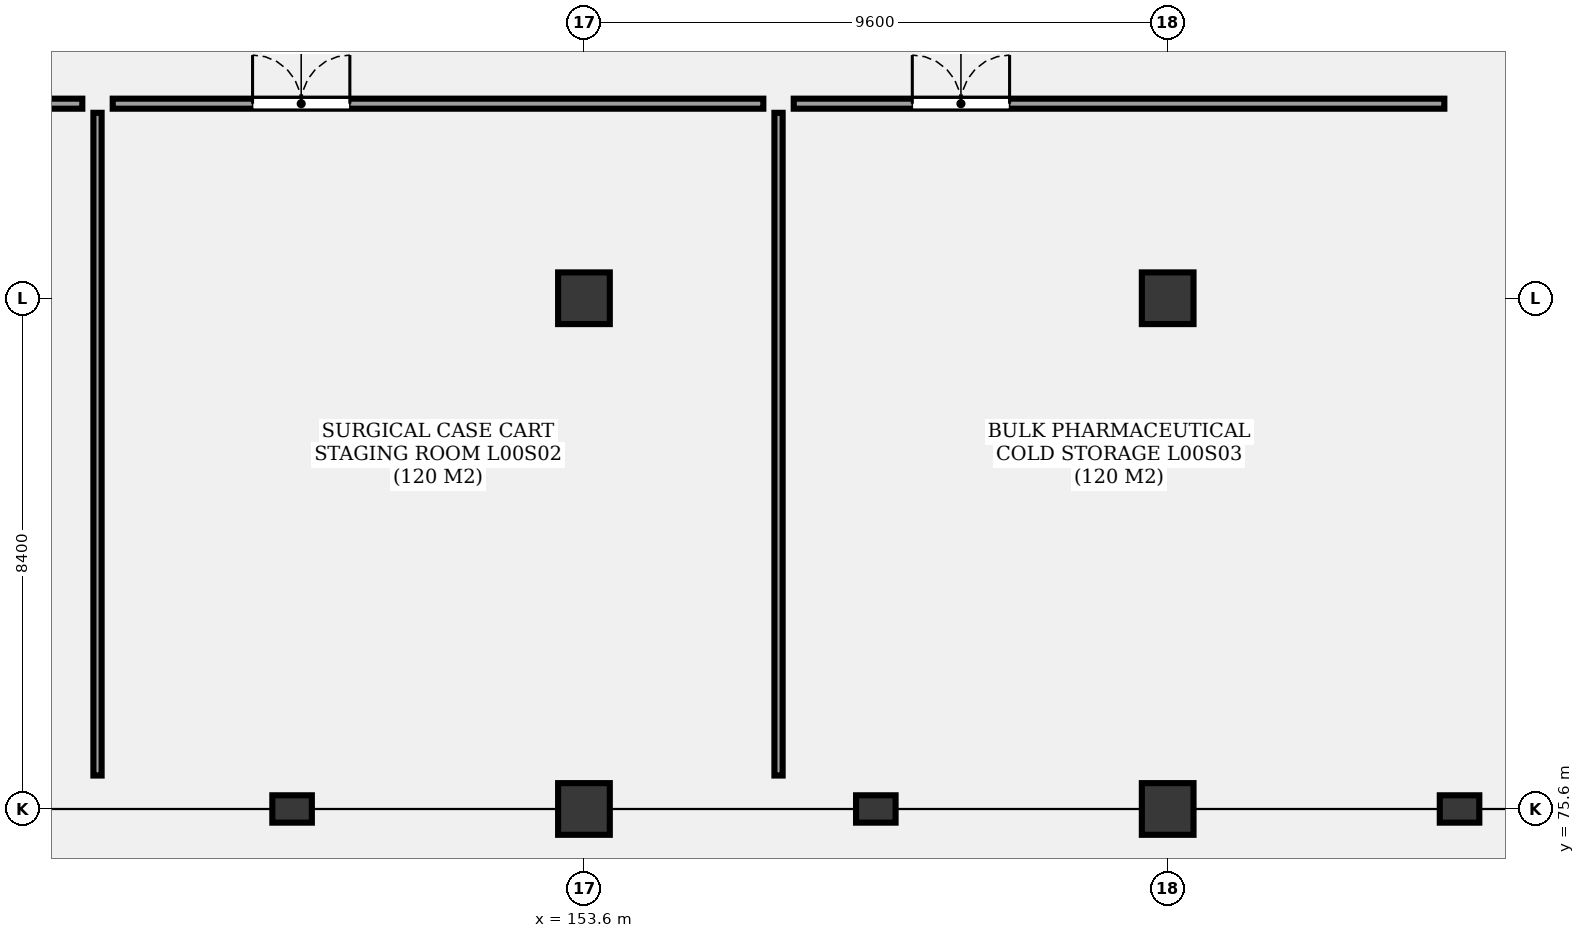
"""IFC4 building model, lengths in metres.
Left out: names, types, materials, properties, quantities, classifications, styles, units other than length and angle.
Written with IfcOpenShell. Run it as: python <this file> out.ifc"""

import sys

from ifc_helpers import new_model, si_unit, direction, frame, frame_2d, origin, origin_2d, place, context, subcontext, project, spatial, rectangle, extrude, element, fill, save


model = new_model("IFC4")
c1 = context("Model", 3, precision=1e-05, world=origin(), true_north=direction((0.0, 1.0)))
c2 = subcontext(c1, "Body", "Model", "MODEL_VIEW")
j1 = project(units=[si_unit("LENGTHUNIT", "METRE"), si_unit("PLANEANGLEUNIT", "RADIAN")], contexts=[c1])
p1 = place(None, origin())
s1 = spatial("IfcSite", under=j1, at=p1, CompositionType="ELEMENT")
p2 = place(p1, origin())
s2 = spatial("IfcBuilding", under=s1, at=p2, CompositionType="ELEMENT")
p3 = place(p2, origin())
s3 = spatial("IfcBuildingStorey", under=s2, at=p3, CompositionType="ELEMENT", Elevation=0.0)
for number, where, z_axis, x_axis in (
    (1, (153.6, 75.6, -0.35), (0.0, 0.0, 1.0), (1.0, 0.0, 0.0)),
    (2, (153.6, 84.0, -0.35), (0.0, 0.0, 1.0), (1.0, 0.0, 0.0)),
    (3, (163.2, 75.6, -0.35), (0.0, 0.0, 1.0), (1.0, 0.0, 0.0)),
    (4, (163.2, 84.0, -0.35), (0.0, 0.0, 1.0), (1.0, 0.0, 0.0)),
):
    element("IfcColumn", number, at=place(p3, frame(where, z_axis=z_axis, x_axis=x_axis)), inside=s3, PredefinedType="COLUMN", context=c2, shape_type="SweptSolid", body=[
        extrude(rectangle(XDim=0.85, YDim=0.85, at=origin_2d()), origin(), (0.0, 0.0, 1.0), 5.45),
    ])
for number, where, z_axis, x_axis in (
    (5, (148.8, 75.6, 0.0), (0.0, 0.0, 1.0), (1.0, 0.0, 0.0)),
    (6, (158.4, 75.6, 0.0), (0.0, 0.0, 1.0), (1.0, 0.0, 0.0)),
    (7, (168.0, 75.6, 0.0), (0.0, 0.0, 1.0), (1.0, 0.0, 0.0)),
):
    element("IfcColumn", number, at=place(p3, frame(where, z_axis=z_axis, x_axis=x_axis)), inside=s3, PredefinedType="PILASTER", context=c2, shape_type="SweptSolid", body=[
        extrude(rectangle(XDim=0.65, YDim=0.45, at=origin_2d()), origin(), (0.0, 0.0, 1.0), 5.1),
    ])
p4 = place(p3, frame((134.65, 87.2, 0.0), z_axis=(0.0, 0.0, 1.0), x_axis=(1.0, 0.0, 0.0)))
e8 = element("IfcWall", 8, at=p4, inside=s3, PredefinedType="PARTITIONING", context=c2, shape_type="SweptSolid", body=[
    extrude(rectangle(XDim=10.7, YDim=0.165, at=frame_2d((5.35, 0.0))), origin(), (0.0, 0.0, 1.0), 3.98),
])
p5 = place(p4, frame((2.65, 0.0, 0.0)))
e9 = element("IfcOpeningElement", 9, at=p5, cuts=e8, PredefinedType="OPENING", context=c2, shape_type="SweptSolid", body=[
    extrude(rectangle(XDim=1.6, YDim=2.2, at=frame_2d((0.8, 1.1))), frame((0.0, 0.093, 0.0), z_axis=(0.0, -1.0, 0.0), x_axis=(1.0, 0.0, 0.0)), (0.0, 0.0, 1.0), 0.185),
])
p6 = place(p3, frame((145.85, 87.2, 0.0), z_axis=(0.0, 0.0, 1.0), x_axis=(1.0, 0.0, 0.0)))
e10 = element("IfcWall", 10, at=p6, inside=s3, PredefinedType="PARTITIONING", context=c2, shape_type="SweptSolid", body=[
    extrude(rectangle(XDim=10.7, YDim=0.165, at=frame_2d((5.35, 0.0))), origin(), (0.0, 0.0, 1.0), 3.98),
])
p7 = place(p6, frame((2.3, 0.0, 0.0)))
e11 = element("IfcOpeningElement", 11, at=p7, cuts=e10, PredefinedType="OPENING", context=c2, shape_type="SweptSolid", body=[
    extrude(rectangle(XDim=1.6, YDim=2.2, at=frame_2d((0.8, 1.1))), frame((0.0, 0.093, 0.0), z_axis=(0.0, -1.0, 0.0), x_axis=(1.0, 0.0, 0.0)), (0.0, 0.0, 1.0), 0.185),
])
p8 = place(p3, frame((145.6, 76.15, 0.0), z_axis=(0.0, 0.0, 1.0), x_axis=(0.0, 1.0, 0.0)))
e12 = element("IfcWall", 12, at=p8, inside=s3, PredefinedType="PARTITIONING", context=c2, shape_type="SweptSolid", body=[
    extrude(rectangle(XDim=10.9, YDim=0.135, at=frame_2d((5.45, 0.0))), origin(), (0.0, 0.0, 1.0), 3.98),
])
p9 = place(p3, frame((157.05, 87.2, 0.0), z_axis=(0.0, 0.0, 1.0), x_axis=(1.0, 0.0, 0.0)))
e13 = element("IfcWall", 13, at=p9, inside=s3, PredefinedType="PARTITIONING", context=c2, shape_type="SweptSolid", body=[
    extrude(rectangle(XDim=10.7, YDim=0.165, at=frame_2d((5.35, 0.0))), origin(), (0.0, 0.0, 1.0), 3.98),
])
p10 = place(p9, frame((1.95, 0.0, 0.0)))
e14 = element("IfcOpeningElement", 14, at=p10, cuts=e13, PredefinedType="OPENING", context=c2, shape_type="SweptSolid", body=[
    extrude(rectangle(XDim=1.6, YDim=2.2, at=frame_2d((0.8, 1.1))), frame((0.0, 0.093, 0.0), z_axis=(0.0, -1.0, 0.0), x_axis=(1.0, 0.0, 0.0)), (0.0, 0.0, 1.0), 0.185),
])
p11 = place(p3, frame((156.8, 76.15, 0.0), z_axis=(0.0, 0.0, 1.0), x_axis=(0.0, 1.0, 0.0)))
e15 = element("IfcWall", 15, at=p11, inside=s3, PredefinedType="PARTITIONING", context=c2, shape_type="SweptSolid", body=[
    extrude(rectangle(XDim=10.9, YDim=0.135, at=frame_2d((5.45, 0.0))), origin(), (0.0, 0.0, 1.0), 3.98),
])
p12 = place(p7, origin())
e16 = element("IfcDoor", 16, at=p12, inside=s3, OperationType="DOUBLE_DOOR_SINGLE_SWING", PredefinedType="DOOR", context=c2, shape_type="SweptSolid", body=[
    extrude(rectangle(XDim=1.6, YDim=2.2, at=frame_2d((0.8, 1.1))), frame((0.0, 0.025, 0.0), z_axis=(0.0, -1.0, 0.0), x_axis=(1.0, 0.0, 0.0)), (0.0, 0.0, 1.0), 0.05),
])
fill(e11, e16)
p13 = place(p10, origin())
e17 = element("IfcDoor", 17, at=p13, inside=s3, OperationType="DOUBLE_DOOR_SINGLE_SWING", PredefinedType="DOOR", context=c2, shape_type="SweptSolid", body=[
    extrude(rectangle(XDim=1.6, YDim=2.2, at=frame_2d((0.8, 1.1))), frame((0.0, 0.025, 0.0), z_axis=(0.0, -1.0, 0.0), x_axis=(1.0, 0.0, 0.0)), (0.0, 0.0, 1.0), 0.05),
])
fill(e14, e17)
save(model, sys.argv[1])
